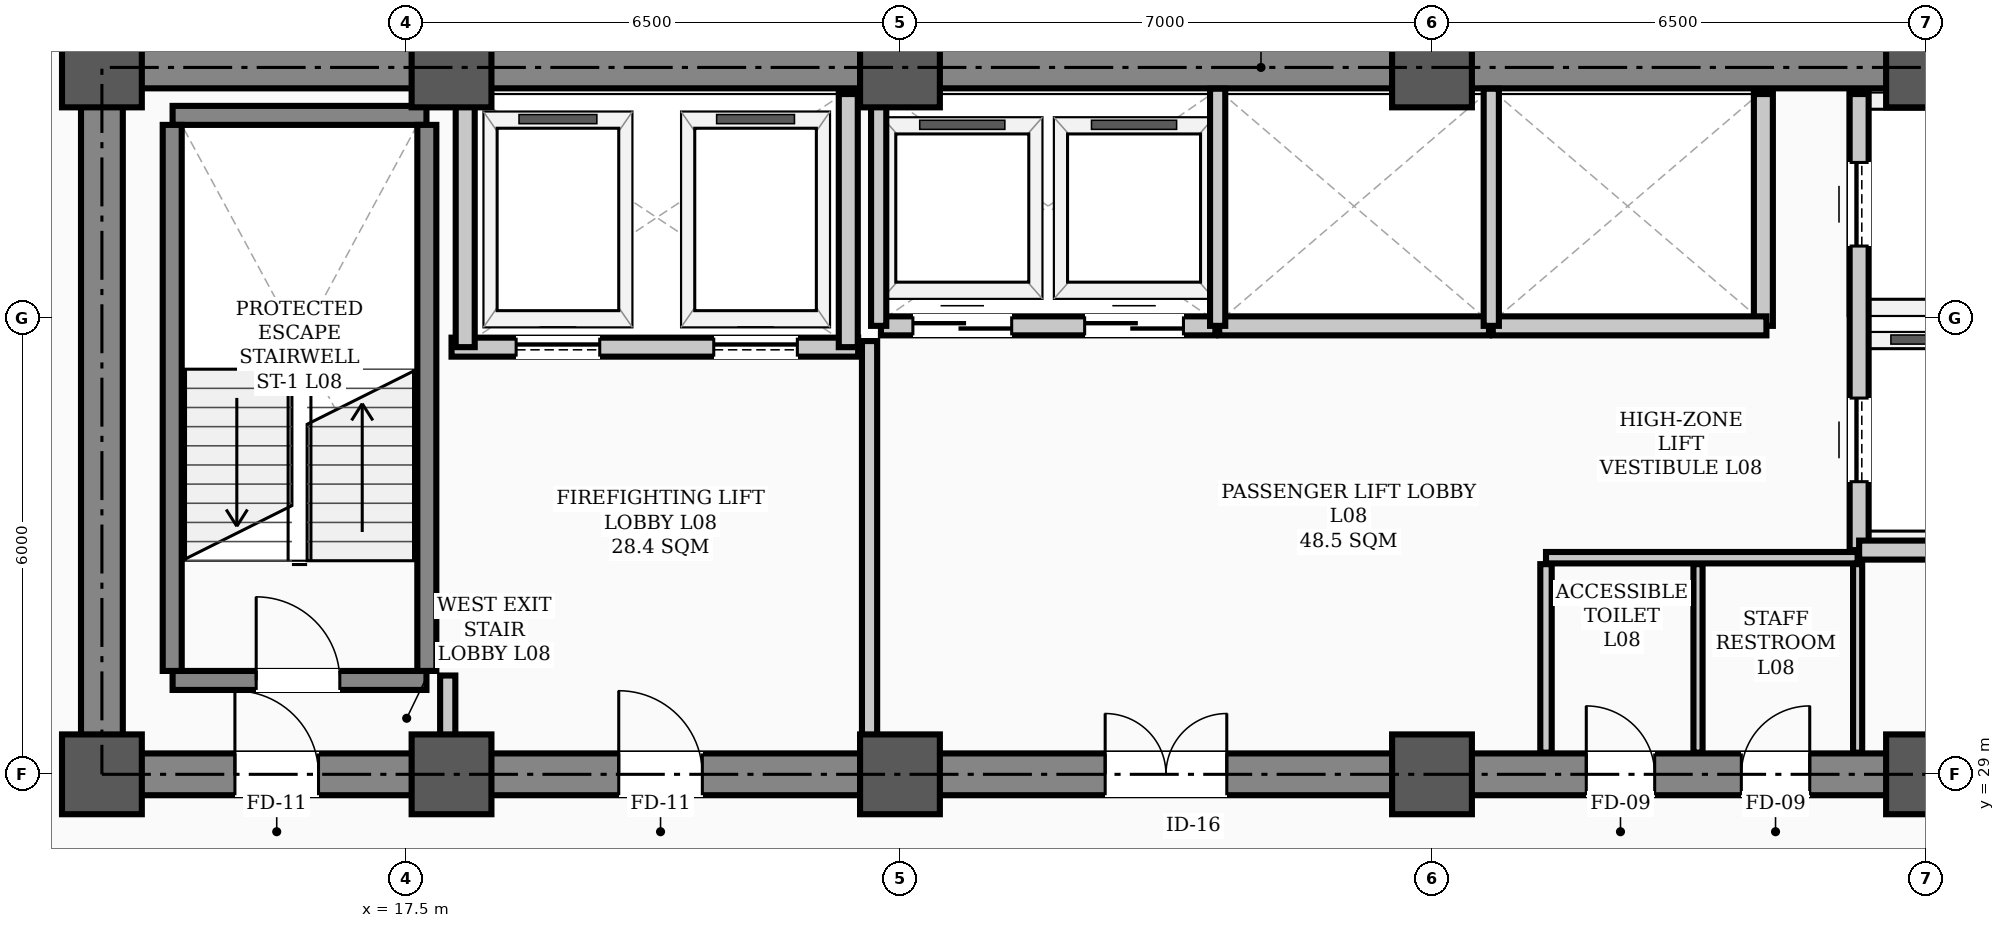
"""IFC4 building model, lengths in metres.
Left out: names, types, materials, properties, quantities, classifications, styles, units other than length and angle.
Written with IfcOpenShell. Run it as: python <this file> out.ifc"""

import sys

from ifc_helpers import new_model, si_unit, direction, frame, frame_2d, origin, origin_2d, place, context, subcontext, project, spatial, rectangle, hollow_rectangle, extrude, element, fill, save


model = new_model("IFC4")
c1 = context("Model", 3, precision=1e-05, world=origin(), true_north=direction((0.0, 1.0)))
c2 = subcontext(c1, "Body", "Model", "MODEL_VIEW")
j1 = project(units=[si_unit("LENGTHUNIT", "METRE"), si_unit("PLANEANGLEUNIT", "RADIAN")], contexts=[c1])
p1 = place(None, origin())
s1 = spatial("IfcSite", under=j1, at=p1, CompositionType="ELEMENT")
p2 = place(p1, origin())
s2 = spatial("IfcBuilding", under=s1, at=p2, CompositionType="ELEMENT")
p3 = place(p2, frame((0.0, 0.0, 34.3)))
s3 = spatial("IfcBuildingStorey", under=s2, at=p3, CompositionType="ELEMENT", Elevation=34.3)
for number, where, z_axis, x_axis in (
    (1, (13.5, 29.0, 0.0), (0.0, 0.0, 1.0), (1.0, 0.0, 0.0)),
    (2, (13.5, 38.3, 0.0), (0.0, 0.0, 1.0), (1.0, 0.0, 0.0)),
    (3, (18.1, 29.0, 0.0), (0.0, 0.0, 1.0), (1.0, 0.0, 0.0)),
    (4, (18.1, 38.3, 0.0), (0.0, 0.0, 1.0), (1.0, 0.0, 0.0)),
    (5, (24.0, 29.0, 0.0), (0.0, 0.0, 1.0), (1.0, 0.0, 0.0)),
    (6, (24.0, 38.3, 0.0), (0.0, 0.0, 1.0), (1.0, 0.0, 0.0)),
    (7, (31.0, 29.0, 0.0), (0.0, 0.0, 1.0), (1.0, 0.0, 0.0)),
    (8, (31.0, 38.3, 0.0), (0.0, 0.0, 1.0), (1.0, 0.0, 0.0)),
    (9, (37.5, 29.0, 0.0), (0.0, 0.0, 1.0), (1.0, 0.0, 0.0)),
    (10, (37.5, 38.3, 0.0), (0.0, 0.0, 1.0), (1.0, 0.0, 0.0)),
):
    element("IfcColumn", number, at=place(p3, frame(where, z_axis=z_axis, x_axis=x_axis)), inside=s3, PredefinedType="COLUMN", context=c2, shape_type="SweptSolid", body=[
        extrude(hollow_rectangle(XDim=1.05, YDim=1.05, WallThickness=0.038, InnerFilletRadius=0.019, OuterFilletRadius=0.057, at=origin_2d()), origin(), (0.0, 0.0, 1.0), 3.9),
    ])
p4 = place(p3, frame((13.5, 29.0, 0.0), z_axis=(0.0, 0.0, 1.0), x_axis=(1.0, 0.0, 0.0)))
e11 = element("IfcWall", 11, at=p4, inside=s3, PredefinedType="SHEAR", context=c2, shape_type="SweptSolid", body=[
    extrude(rectangle(XDim=30.5, YDim=0.55, at=frame_2d((15.25, 0.0))), origin(), (0.0, 0.0, 1.0), 3.72),
])
p5 = place(p4, frame((1.75, 0.0, 0.0)))
e12 = element("IfcOpeningElement", 12, at=p5, cuts=e11, PredefinedType="OPENING", context=c2, shape_type="SweptSolid", body=[
    extrude(rectangle(XDim=1.1, YDim=2.08, at=frame_2d((0.55, 1.04))), frame((0.0, 0.285, 0.0), z_axis=(0.0, -1.0, 0.0), x_axis=(1.0, 0.0, 0.0)), (0.0, 0.0, 1.0), 0.57),
])
p6 = place(p4, frame((26.7, 0.0, 0.0)))
e13 = element("IfcOpeningElement", 13, at=p6, cuts=e11, PredefinedType="OPENING", context=c2, shape_type="SweptSolid", body=[
    extrude(rectangle(XDim=1.1, YDim=2.08, at=frame_2d((0.55, 1.04))), frame((0.0, 0.285, 0.0), z_axis=(0.0, -1.0, 0.0), x_axis=(1.0, 0.0, 0.0)), (0.0, 0.0, 1.0), 0.57),
])
p7 = place(p4, frame((6.8, 0.0, 0.0)))
e14 = element("IfcOpeningElement", 14, at=p7, cuts=e11, PredefinedType="OPENING", context=c2, shape_type="SweptSolid", body=[
    extrude(rectangle(XDim=1.1, YDim=2.08, at=frame_2d((0.55, 1.04))), frame((0.0, 0.285, 0.0), z_axis=(0.0, -1.0, 0.0), x_axis=(1.0, 0.0, 0.0)), (0.0, 0.0, 1.0), 0.57),
])
p8 = place(p4, frame((13.2, 0.0, 0.0)))
e15 = element("IfcOpeningElement", 15, at=p8, cuts=e11, PredefinedType="OPENING", context=c2, shape_type="SweptSolid", body=[
    extrude(rectangle(XDim=1.6, YDim=2.08, at=frame_2d((0.8, 1.04))), frame((0.0, 0.285, 0.0), z_axis=(0.0, -1.0, 0.0), x_axis=(1.0, 0.0, 0.0)), (0.0, 0.0, 1.0), 0.57),
])
p9 = place(p4, frame((19.53, 0.0, 0.0)))
e16 = element("IfcOpeningElement", 16, at=p9, cuts=e11, PredefinedType="OPENING", context=c2, shape_type="SweptSolid", body=[
    extrude(rectangle(XDim=0.9, YDim=2.08, at=frame_2d((0.45, 1.04))), frame((0.0, 0.285, 0.0), z_axis=(0.0, -1.0, 0.0), x_axis=(1.0, 0.0, 0.0)), (0.0, 0.0, 1.0), 0.57),
])
p10 = place(p4, frame((21.57, 0.0, 0.0)))
e17 = element("IfcOpeningElement", 17, at=p10, cuts=e11, PredefinedType="OPENING", context=c2, shape_type="SweptSolid", body=[
    extrude(rectangle(XDim=0.9, YDim=2.08, at=frame_2d((0.45, 1.04))), frame((0.0, 0.285, 0.0), z_axis=(0.0, -1.0, 0.0), x_axis=(1.0, 0.0, 0.0)), (0.0, 0.0, 1.0), 0.57),
])
p11 = place(p3, frame((13.5, 38.3, 0.0), z_axis=(0.0, 0.0, 1.0), x_axis=(1.0, 0.0, 0.0)))
e18 = element("IfcWall", 18, at=p11, inside=s3, PredefinedType="SHEAR", context=c2, shape_type="SweptSolid", body=[
    extrude(rectangle(XDim=30.5, YDim=0.55, at=frame_2d((15.25, 0.0))), origin(), (0.0, 0.0, 1.0), 3.72),
])
p12 = place(p3, frame((13.5, 29.35, 0.0), z_axis=(0.0, 0.0, 1.0), x_axis=(0.0, 1.0, 0.0)))
e19 = element("IfcWall", 19, at=p12, inside=s3, PredefinedType="SHEAR", context=c2, shape_type="SweptSolid", body=[
    extrude(rectangle(XDim=8.6, YDim=0.55, at=frame_2d((4.3, 0.0))), origin(), (0.0, 0.0, 1.0), 3.72),
])
p13 = place(p3, frame((14.43, 30.235, 0.0), z_axis=(0.0, 0.0, 1.0), x_axis=(1.0, 0.0, 0.0)))
e20 = element("IfcWall", 20, at=p13, inside=s3, PredefinedType="STANDARD", context=c2, shape_type="SweptSolid", body=[
    extrude(rectangle(XDim=3.34, YDim=0.25, at=frame_2d((1.67, 0.0))), origin(), (0.0, 0.0, 1.0), 3.72),
])
p14 = place(p13, frame((1.1, 0.0, 0.0)))
e21 = element("IfcOpeningElement", 21, at=p14, cuts=e20, PredefinedType="OPENING", context=c2, shape_type="SweptSolid", body=[
    extrude(rectangle(XDim=1.1, YDim=2.08, at=frame_2d((0.55, 1.04))), frame((0.0, 0.135, 0.0), z_axis=(0.0, -1.0, 0.0), x_axis=(1.0, 0.0, 0.0)), (0.0, 0.0, 1.0), 0.27),
])
p15 = place(p3, frame((14.43, 37.669, 0.0), z_axis=(0.0, 0.0, 1.0), x_axis=(1.0, 0.0, 0.0)))
e22 = element("IfcWall", 22, at=p15, inside=s3, PredefinedType="STANDARD", context=c2, shape_type="SweptSolid", body=[
    extrude(rectangle(XDim=3.34, YDim=0.25, at=frame_2d((1.67, 0.0))), origin(), (0.0, 0.0, 1.0), 3.72),
])
for number, where, z_axis, x_axis in (
    (23, (14.425, 30.36, 0.0), (0.0, 0.0, 1.0), (0.0, 1.0, 0.0)),
    (24, (17.775, 30.36, 0.0), (0.0, 0.0, 1.0), (0.0, 1.0, 0.0)),
):
    element("IfcWall", number, at=place(p3, frame(where, z_axis=z_axis, x_axis=x_axis)), inside=s3, PredefinedType="STANDARD", context=c2, shape_type="SweptSolid", body=[
        extrude(rectangle(XDim=7.184, YDim=0.25, at=frame_2d((3.592, 0.0))), origin(), (0.0, 0.0, 1.0), 3.72),
    ])
p16 = place(p3, frame((18.1, 34.62, 0.0), z_axis=(0.0, 0.0, 1.0), x_axis=(1.0, 0.0, 0.0)))
e25 = element("IfcWall", 25, at=p16, inside=s3, PredefinedType="STANDARD", context=c2, shape_type="SweptSolid", body=[
    extrude(rectangle(XDim=5.35, YDim=0.25, at=frame_2d((2.675, 0.0))), origin(), (0.0, 0.0, 1.0), 3.72),
])
p17 = place(p16, frame((0.85, 0.0, 0.0)))
e26 = element("IfcOpeningElement", 26, at=p17, cuts=e25, PredefinedType="OPENING", context=c2, shape_type="SweptSolid", body=[
    extrude(rectangle(XDim=1.1, YDim=2.08, at=frame_2d((0.55, 1.04))), frame((0.0, 0.135, 0.0), z_axis=(0.0, -1.0, 0.0), x_axis=(1.0, 0.0, 0.0)), (0.0, 0.0, 1.0), 0.27),
])
p18 = place(p16, frame((3.45, 0.0, 0.0)))
e27 = element("IfcOpeningElement", 27, at=p18, cuts=e25, PredefinedType="OPENING", context=c2, shape_type="SweptSolid", body=[
    extrude(rectangle(XDim=1.1, YDim=2.08, at=frame_2d((0.55, 1.04))), frame((0.0, 0.135, 0.0), z_axis=(0.0, -1.0, 0.0), x_axis=(1.0, 0.0, 0.0)), (0.0, 0.0, 1.0), 0.27),
])
p19 = place(p3, frame((36.62, 31.95, 0.0), z_axis=(0.0, 0.0, 1.0), x_axis=(0.0, 1.0, 0.0)))
e28 = element("IfcWall", 28, at=p19, inside=s3, PredefinedType="STANDARD", context=c2, shape_type="SweptSolid", body=[
    extrude(rectangle(XDim=6.0, YDim=0.25, at=frame_2d((3.0, 0.0))), origin(), (0.0, 0.0, 1.0), 3.3),
])
p20 = place(p19, frame((0.9, 0.0, 0.0)))
e29 = element("IfcOpeningElement", 29, at=p20, cuts=e28, PredefinedType="OPENING", context=c2, shape_type="SweptSolid", body=[
    extrude(rectangle(XDim=1.1, YDim=2.08, at=frame_2d((0.55, 1.04))), frame((0.0, 0.135, 0.0), z_axis=(0.0, -1.0, 0.0), x_axis=(1.0, 0.0, 0.0)), (0.0, 0.0, 1.0), 0.27),
])
p21 = place(p19, frame((4.0, 0.0, 0.0)))
e30 = element("IfcOpeningElement", 30, at=p21, cuts=e28, PredefinedType="OPENING", context=c2, shape_type="SweptSolid", body=[
    extrude(rectangle(XDim=1.1, YDim=2.08, at=frame_2d((0.55, 1.04))), frame((0.0, 0.135, 0.0), z_axis=(0.0, -1.0, 0.0), x_axis=(1.0, 0.0, 0.0)), (0.0, 0.0, 1.0), 0.27),
])
p22 = place(p3, frame((36.62, 31.95, 0.0), z_axis=(0.0, 0.0, 1.0), x_axis=(1.0, 0.0, 0.0)))
e31 = element("IfcWall", 31, at=p22, inside=s3, PredefinedType="STANDARD", context=c2, shape_type="SweptSolid", body=[
    extrude(rectangle(XDim=1.9, YDim=0.25, at=frame_2d((0.95, 0.0))), origin(), (0.0, 0.0, 1.0), 3.48),
])
for number, where, z_axis, x_axis in (
    (32, (18.28, 34.62, 0.0), (0.0, 0.0, 1.0), (0.0, 1.0, 0.0)),
    (33, (23.32, 34.62, 0.0), (0.0, 0.0, 1.0), (0.0, 1.0, 0.0)),
):
    element("IfcWall", number, at=place(p3, frame(where, z_axis=z_axis, x_axis=x_axis)), inside=s3, PredefinedType="STANDARD", context=c2, shape_type="SweptSolid", body=[
        extrude(rectangle(XDim=3.33, YDim=0.25, at=frame_2d((1.665, 0.0))), origin(), (0.0, 0.0, 1.0), 3.3),
    ])
p23 = place(p3, frame((35.36, 34.9, 0.0), z_axis=(0.0, 0.0, 1.0), x_axis=(0.0, 1.0, 0.0)))
e34 = element("IfcWall", 34, at=p23, inside=s3, PredefinedType="STANDARD", context=c2, shape_type="SweptSolid", body=[
    extrude(rectangle(XDim=3.05, YDim=0.25, at=frame_2d((1.525, 0.0))), origin(), (0.0, 0.0, 1.0), 3.3),
])
p24 = place(p3, frame((23.75, 34.9, 0.0), z_axis=(0.0, 0.0, 1.0), x_axis=(1.0, 0.0, 0.0)))
e35 = element("IfcWall", 35, at=p24, inside=s3, PredefinedType="STANDARD", context=c2, shape_type="SweptSolid", body=[
    extrude(rectangle(XDim=4.4, YDim=0.25, at=frame_2d((2.2, 0.0))), origin(), (0.0, 0.0, 1.0), 3.72),
])
p25 = place(p24, frame((0.42, 0.0, 0.0)))
e36 = element("IfcOpeningElement", 36, at=p25, cuts=e35, PredefinedType="OPENING", context=c2, shape_type="SweptSolid", body=[
    extrude(rectangle(XDim=1.3, YDim=2.08, at=frame_2d((0.65, 1.04))), frame((0.0, 0.135, 0.0), z_axis=(0.0, -1.0, 0.0), x_axis=(1.0, 0.0, 0.0)), (0.0, 0.0, 1.0), 0.27),
])
p26 = place(p24, frame((2.68, 0.0, 0.0)))
e37 = element("IfcOpeningElement", 37, at=p26, cuts=e35, PredefinedType="OPENING", context=c2, shape_type="SweptSolid", body=[
    extrude(rectangle(XDim=1.3, YDim=2.08, at=frame_2d((0.65, 1.04))), frame((0.0, 0.135, 0.0), z_axis=(0.0, -1.0, 0.0), x_axis=(1.0, 0.0, 0.0)), (0.0, 0.0, 1.0), 0.27),
])
p27 = place(p3, frame((28.2, 34.9, 0.0), z_axis=(0.0, 0.0, 1.0), x_axis=(1.0, 0.0, 0.0)))
e38 = element("IfcWall", 38, at=p27, inside=s3, PredefinedType="STANDARD", context=c2, shape_type="SweptSolid", body=[
    extrude(rectangle(XDim=3.55, YDim=0.25, at=frame_2d((1.775, 0.0))), origin(), (0.0, 0.0, 1.0), 3.72),
])
p28 = place(p3, frame((31.8, 34.9, 0.0), z_axis=(0.0, 0.0, 1.0), x_axis=(1.0, 0.0, 0.0)))
e39 = element("IfcWall", 39, at=p28, inside=s3, PredefinedType="STANDARD", context=c2, shape_type="SweptSolid", body=[
    extrude(rectangle(XDim=3.6, YDim=0.25, at=frame_2d((1.8, 0.0))), origin(), (0.0, 0.0, 1.0), 3.72),
])
p29 = place(p3, frame((32.5, 31.85, 0.0), z_axis=(0.0, 0.0, 1.0), x_axis=(1.0, 0.0, 0.0)))
e40 = element("IfcWall", 40, at=p29, inside=s3, PredefinedType="PARTITIONING", context=c2, shape_type="SweptSolid", body=[
    extrude(rectangle(XDim=4.1, YDim=0.15, at=frame_2d((2.05, 0.0))), origin(), (0.0, 0.0, 1.0), 3.72),
])
p30 = place(p3, frame((18.05, 29.285, 0.0), z_axis=(0.0, 0.0, 1.0), x_axis=(0.0, 1.0, 0.0)))
e41 = element("IfcWall", 41, at=p30, inside=s3, PredefinedType="STANDARD", context=c2, shape_type="SweptSolid", body=[
    extrude(rectangle(XDim=1.015, YDim=0.2, at=frame_2d((0.508, 0.0))), origin(), (0.0, 0.0, 1.0), 3.3),
])
p31 = place(p3, frame((23.6, 29.285, 0.0), z_axis=(0.0, 0.0, 1.0), x_axis=(0.0, 1.0, 0.0)))
e42 = element("IfcWall", 42, at=p31, inside=s3, PredefinedType="STANDARD", context=c2, shape_type="SweptSolid", body=[
    extrude(rectangle(XDim=5.415, YDim=0.2, at=frame_2d((2.708, 0.0))), origin(), (0.0, 0.0, 1.0), 3.1),
])
p32 = place(p3, frame((32.5, 29.285, 0.0), z_axis=(0.0, 0.0, 1.0), x_axis=(0.0, 1.0, 0.0)))
e43 = element("IfcWall", 43, at=p32, inside=s3, PredefinedType="PARTITIONING", context=c2, shape_type="SweptSolid", body=[
    extrude(rectangle(XDim=2.48, YDim=0.15, at=frame_2d((1.24, 0.0))), origin(), (0.0, 0.0, 1.0), 3.3),
])
for number, where, z_axis, x_axis in (
    (44, (36.6, 29.285, 0.0), (0.0, 0.0, 1.0), (0.0, 1.0, 0.0)),
    (45, (34.5, 29.285, 0.0), (0.0, 0.0, 1.0), (0.0, 1.0, 0.0)),
):
    element("IfcWall", number, at=place(p3, frame(where, z_axis=z_axis, x_axis=x_axis)), inside=s3, PredefinedType="PARTITIONING", context=c2, shape_type="SweptSolid", body=[
        extrude(rectangle(XDim=2.48, YDim=0.12, at=frame_2d((1.24, 0.0))), origin(), (0.0, 0.0, 1.0), 3.3),
    ])
p33 = place(p3, frame((23.72, 34.9, 0.0), z_axis=(0.0, 0.0, 1.0), x_axis=(0.0, 1.0, 0.0)))
e46 = element("IfcWall", 46, at=p33, inside=s3, PredefinedType="STANDARD", context=c2, shape_type="SweptSolid", body=[
    extrude(rectangle(XDim=3.12, YDim=0.2, at=frame_2d((1.56, 0.0))), origin(), (0.0, 0.0, 1.0), 3.1),
])
for number, where, z_axis, x_axis in (
    (47, (28.18, 34.9, 0.0), (0.0, 0.0, 1.0), (0.0, 1.0, 0.0)),
    (48, (31.78, 34.9, 0.0), (0.0, 0.0, 1.0), (0.0, 1.0, 0.0)),
):
    element("IfcWall", number, at=place(p3, frame(where, z_axis=z_axis, x_axis=x_axis)), inside=s3, PredefinedType="STANDARD", context=c2, shape_type="SweptSolid", body=[
        extrude(rectangle(XDim=3.12, YDim=0.2, at=frame_2d((1.56, 0.0))), origin(), (0.0, 0.0, 1.0), 3.3),
    ])
p34 = place(p14, origin())
e49 = element("IfcDoor", 49, at=p34, inside=s3, OperationType="SINGLE_SWING_LEFT", PredefinedType="DOOR", context=c2, shape_type="SweptSolid", body=[
    extrude(rectangle(XDim=1.1, YDim=2.08, at=frame_2d((0.55, 1.04))), frame((0.0, 0.025, 0.0), z_axis=(0.0, -1.0, 0.0), x_axis=(1.0, 0.0, 0.0)), (0.0, 0.0, 1.0), 0.05),
])
fill(e21, e49)
p35 = place(p5, origin())
e50 = element("IfcDoor", 50, at=p35, inside=s3, OperationType="SINGLE_SWING_LEFT", PredefinedType="DOOR", context=c2, shape_type="SweptSolid", body=[
    extrude(rectangle(XDim=1.1, YDim=2.08, at=frame_2d((0.55, 1.04))), frame((0.0, 0.025, 0.0), z_axis=(0.0, -1.0, 0.0), x_axis=(1.0, 0.0, 0.0)), (0.0, 0.0, 1.0), 0.05),
])
fill(e12, e50)
p36 = place(p7, origin())
e51 = element("IfcDoor", 51, at=p36, inside=s3, OperationType="SINGLE_SWING_LEFT", PredefinedType="DOOR", context=c2, shape_type="SweptSolid", body=[
    extrude(rectangle(XDim=1.1, YDim=2.08, at=frame_2d((0.55, 1.04))), frame((0.0, 0.025, 0.0), z_axis=(0.0, -1.0, 0.0), x_axis=(1.0, 0.0, 0.0)), (0.0, 0.0, 1.0), 0.05),
])
fill(e14, e51)
p37 = place(p8, origin())
e52 = element("IfcDoor", 52, at=p37, inside=s3, OperationType="DOUBLE_DOOR_SINGLE_SWING", PredefinedType="DOOR", context=c2, shape_type="SweptSolid", body=[
    extrude(rectangle(XDim=1.6, YDim=2.08, at=frame_2d((0.8, 1.04))), frame((0.0, 0.025, 0.0), z_axis=(0.0, -1.0, 0.0), x_axis=(1.0, 0.0, 0.0)), (0.0, 0.0, 1.0), 0.05),
])
fill(e15, e52)
p38 = place(p9, origin())
e53 = element("IfcDoor", 53, at=p38, inside=s3, OperationType="SINGLE_SWING_LEFT", PredefinedType="DOOR", context=c2, shape_type="SweptSolid", body=[
    extrude(rectangle(XDim=0.9, YDim=2.08, at=frame_2d((0.45, 1.04))), frame((0.0, 0.025, 0.0), z_axis=(0.0, -1.0, 0.0), x_axis=(1.0, 0.0, 0.0)), (0.0, 0.0, 1.0), 0.05),
])
fill(e16, e53)
p39 = place(p10, origin())
e54 = element("IfcDoor", 54, at=p39, inside=s3, OperationType="SINGLE_SWING_RIGHT", PredefinedType="DOOR", context=c2, shape_type="SweptSolid", body=[
    extrude(rectangle(XDim=0.9, YDim=2.08, at=frame_2d((0.45, 1.04))), frame((0.0, 0.025, 0.0), z_axis=(0.0, -1.0, 0.0), x_axis=(1.0, 0.0, 0.0)), (0.0, 0.0, 1.0), 0.05),
])
fill(e17, e54)
p40 = place(p17, origin())
e55 = element("IfcDoor", 55, at=p40, inside=s3, OperationType="SLIDING_TO_LEFT", PredefinedType="DOOR", context=c2, shape_type="SweptSolid", body=[
    extrude(rectangle(XDim=1.1, YDim=2.08, at=frame_2d((0.55, 1.04))), frame((0.0, 0.025, 0.0), z_axis=(0.0, -1.0, 0.0), x_axis=(1.0, 0.0, 0.0)), (0.0, 0.0, 1.0), 0.05),
])
fill(e26, e55)
p41 = place(p18, origin())
e56 = element("IfcDoor", 56, at=p41, inside=s3, OperationType="SLIDING_TO_LEFT", PredefinedType="DOOR", context=c2, shape_type="SweptSolid", body=[
    extrude(rectangle(XDim=1.1, YDim=2.08, at=frame_2d((0.55, 1.04))), frame((0.0, 0.025, 0.0), z_axis=(0.0, -1.0, 0.0), x_axis=(1.0, 0.0, 0.0)), (0.0, 0.0, 1.0), 0.05),
])
fill(e27, e56)
p42 = place(p20, origin())
e57 = element("IfcDoor", 57, at=p42, inside=s3, OperationType="SLIDING_TO_LEFT", PredefinedType="DOOR", context=c2, shape_type="SweptSolid", body=[
    extrude(rectangle(XDim=1.1, YDim=2.08, at=frame_2d((0.55, 1.04))), frame((0.0, 0.025, 0.0), z_axis=(0.0, -1.0, 0.0), x_axis=(1.0, 0.0, 0.0)), (0.0, 0.0, 1.0), 0.05),
])
fill(e29, e57)
p43 = place(p21, origin())
e58 = element("IfcDoor", 58, at=p43, inside=s3, OperationType="SLIDING_TO_LEFT", PredefinedType="DOOR", context=c2, shape_type="SweptSolid", body=[
    extrude(rectangle(XDim=1.1, YDim=2.08, at=frame_2d((0.55, 1.04))), frame((0.0, 0.025, 0.0), z_axis=(0.0, -1.0, 0.0), x_axis=(1.0, 0.0, 0.0)), (0.0, 0.0, 1.0), 0.05),
])
fill(e30, e58)
p44 = place(p25, origin())
e59 = element("IfcDoor", 59, at=p44, inside=s3, OperationType="DOUBLE_DOOR_SLIDING", PredefinedType="DOOR", context=c2, shape_type="SweptSolid", body=[
    extrude(rectangle(XDim=1.3, YDim=2.08, at=frame_2d((0.65, 1.04))), frame((0.0, 0.025, 0.0), z_axis=(0.0, -1.0, 0.0), x_axis=(1.0, 0.0, 0.0)), (0.0, 0.0, 1.0), 0.05),
])
fill(e36, e59)
p45 = place(p26, origin())
e60 = element("IfcDoor", 60, at=p45, inside=s3, OperationType="DOUBLE_DOOR_SLIDING", PredefinedType="DOOR", context=c2, shape_type="SweptSolid", body=[
    extrude(rectangle(XDim=1.3, YDim=2.08, at=frame_2d((0.65, 1.04))), frame((0.0, 0.025, 0.0), z_axis=(0.0, -1.0, 0.0), x_axis=(1.0, 0.0, 0.0)), (0.0, 0.0, 1.0), 0.05),
])
fill(e37, e60)
save(model, sys.argv[1])
